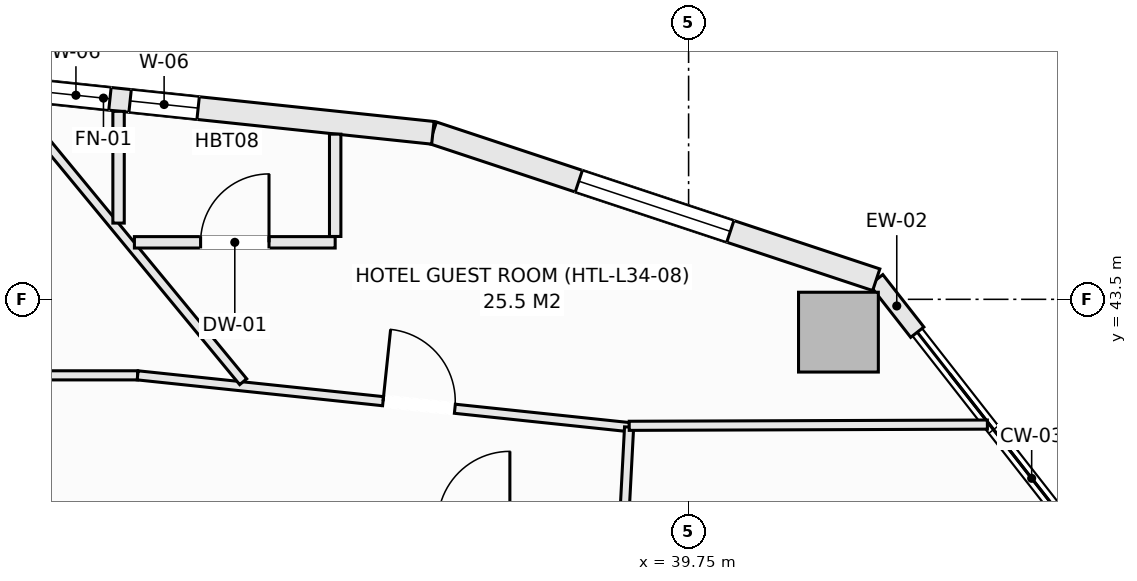
"""IFC4 building model, lengths in metres.
Left out: names, types, materials, properties, quantities, classifications, styles, units other than length and angle.
Written with IfcOpenShell. Run it as: python <this file> out.ifc"""

import sys

from ifc_helpers import new_model, si_unit, direction, frame, frame_2d, origin, origin_2d, place, context, subcontext, project, spatial, rectangle, extrude, element, fill, save


model = new_model("IFC4")
c1 = context("Model", 3, precision=1e-05, world=origin(), true_north=direction((0.0, 1.0)))
c2 = subcontext(c1, "Body", "Model", "MODEL_VIEW")
j1 = project(units=[si_unit("LENGTHUNIT", "METRE"), si_unit("PLANEANGLEUNIT", "RADIAN")], contexts=[c1])
p1 = place(None, origin())
s1 = spatial("IfcSite", under=j1, at=p1, CompositionType="ELEMENT")
p2 = place(p1, origin())
s2 = spatial("IfcBuilding", under=s1, at=p2, CompositionType="ELEMENT")
p3 = place(p2, frame((0.0, 0.0, 135.9)))
s3 = spatial("IfcBuildingStorey", under=s2, at=p3, CompositionType="ELEMENT", Elevation=135.9)
p4 = place(p3, frame((41.721, 43.068, -0.27), z_axis=(0.0, 0.0, 1.0), x_axis=(1.0, 0.0, 0.0)))
e1 = element("IfcColumn", 1, at=p4, inside=s3, PredefinedType="COLUMN", context=c2, shape_type="SweptSolid", body=[
    extrude(rectangle(XDim=1.05, YDim=1.05, at=origin_2d()), origin(), (0.0, 0.0, 1.0), 3.4),
])
p5 = place(p3, frame((42.219, 43.758, 0.0), z_axis=(0.0, 0.0, 1.0), x_axis=(0.61650363284, -0.787352062736, 0.0)))
e2 = element("IfcWall", 2, at=p5, inside=s3, PredefinedType="SOLIDWALL", context=c2, shape_type="SweptSolid", body=[
    extrude(rectangle(XDim=0.876, YDim=0.22, at=frame_2d((0.438, 0.0))), origin(), (0.0, 0.0, 1.0), 2.653),
])
p6 = place(p3, frame((36.385, 45.691, 0.0), z_axis=(0.0, 0.0, 1.0), x_axis=(0.949238009374, -0.314558741032, 0.0)))
e3 = element("IfcWall", 3, at=p6, inside=s3, PredefinedType="SOLIDWALL", context=c2, shape_type="SweptSolid", body=[
    extrude(rectangle(XDim=6.146, YDim=0.3, at=frame_2d((3.073, 0.0))), origin(), (0.0, 0.0, 1.0), 2.653),
])
p7 = place(p6, frame((2.023, 0.0, 0.74)))
e4 = element("IfcOpeningElement", 4, at=p7, cuts=e3, PredefinedType="OPENING", context=c2, shape_type="SweptSolid", body=[
    extrude(rectangle(XDim=2.1, YDim=1.7, at=frame_2d((1.05, 0.85))), frame((0.0, 0.16, 0.0), z_axis=(0.0, -1.0, 0.0), x_axis=(1.0, 0.0, 0.0)), (0.0, 0.0, 1.0), 0.32),
])
p8 = place(p3, frame((30.125, 46.35, 0.0), z_axis=(0.0, 0.0, 1.0), x_axis=(0.994498012394, -0.104755445421, 0.0)))
e5 = element("IfcWall", 5, at=p8, inside=s3, PredefinedType="SOLIDWALL", context=c2, shape_type="SweptSolid", body=[
    extrude(rectangle(XDim=6.295, YDim=0.3, at=frame_2d((3.147, 0.0))), origin(), (0.0, 0.0, 1.0), 2.653),
])
p9 = place(p8, frame((1.123, 0.0, 0.74)))
e6 = element("IfcOpeningElement", 6, at=p9, cuts=e5, PredefinedType="OPENING", context=c2, shape_type="SweptSolid", body=[
    extrude(rectangle(XDim=0.9, YDim=1.7, at=frame_2d((0.45, 0.85))), frame((0.0, 0.16, 0.0), z_axis=(0.0, -1.0, 0.0), x_axis=(1.0, 0.0, 0.0)), (0.0, 0.0, 1.0), 0.32),
])
p10 = place(p8, frame((2.289, 0.0, 0.74)))
e7 = element("IfcOpeningElement", 7, at=p10, cuts=e5, PredefinedType="OPENING", context=c2, shape_type="SweptSolid", body=[
    extrude(rectangle(XDim=0.9, YDim=1.7, at=frame_2d((0.45, 0.85))), frame((0.0, 0.16, 0.0), z_axis=(0.0, -1.0, 0.0), x_axis=(1.0, 0.0, 0.0)), (0.0, 0.0, 1.0), 0.32),
])
p11 = place(p3, frame((27.749, 42.5, 0.0), z_axis=(0.0, 0.0, 1.0), x_axis=(1.0, 0.0, 0.0)))
e8 = element("IfcWall", 8, at=p11, inside=s3, PredefinedType="PARTITIONING", context=c2, shape_type="SweptSolid", body=[
    extrude(rectangle(XDim=4.752, YDim=0.12, at=frame_2d((2.376, 0.0))), origin(), (0.0, 0.0, 1.0), 3.13),
])
p12 = place(p3, frame((32.501, 42.5, 0.0), z_axis=(0.0, 0.0, 1.0), x_axis=(0.994501131299, -0.104725831799, 0.0)))
e9 = element("IfcWall", 9, at=p12, inside=s3, PredefinedType="PARTITIONING", context=c2, shape_type="SweptSolid", body=[
    extrude(rectangle(XDim=6.502, YDim=0.12, at=frame_2d((3.251, 0.0))), origin(), (0.0, 0.0, 1.0), 3.13),
])
p13 = place(p12, frame((3.247, 0.0, 0.0)))
e10 = element("IfcOpeningElement", 10, at=p13, cuts=e9, PredefinedType="OPENING", context=c2, shape_type="SweptSolid", body=[
    extrude(rectangle(XDim=0.95, YDim=2.1, at=frame_2d((0.475, 1.05))), frame((0.0, 0.07, 0.0), z_axis=(0.0, -1.0, 0.0), x_axis=(1.0, 0.0, 0.0)), (0.0, 0.0, 1.0), 0.14),
])
p14 = place(p3, frame((38.9, 40.55, 0.0), z_axis=(0.0, 0.0, 1.0), x_axis=(0.052831079727, 0.99860346335, 0.0)))
e11 = element("IfcWall", 11, at=p14, inside=s3, PredefinedType="PARTITIONING", context=c2, shape_type="SweptSolid", body=[
    extrude(rectangle(XDim=1.271, YDim=0.12, at=frame_2d((0.635, 0.0))), origin(), (0.0, 0.0, 1.0), 3.13),
])
p15 = place(p3, frame((30.835, 46.122, 0.0), z_axis=(0.0, 0.0, 1.0), x_axis=(0.636070633964, -0.771630836999, 0.0)))
e12 = element("IfcWall", 12, at=p15, inside=s3, PredefinedType="PARTITIONING", context=c2, shape_type="SweptSolid", body=[
    extrude(rectangle(XDim=4.803, YDim=0.12, at=frame_2d((2.402, 0.0))), origin(), (0.0, 0.0, 1.0), 2.653),
])
p16 = place(p3, frame((38.969, 41.836, 0.0), z_axis=(0.0, 0.0, 1.0), x_axis=(0.999993975638, 0.003471121975, 0.0)))
e13 = element("IfcWall", 13, at=p16, inside=s3, PredefinedType="PARTITIONING", context=c2, shape_type="SweptSolid", body=[
    extrude(rectangle(XDim=4.712, YDim=0.12, at=frame_2d((2.356, 0.0))), origin(), (0.0, 0.0, 1.0), 2.653),
])
p17 = place(p3, frame((32.458, 44.25, 0.0), z_axis=(0.0, 0.0, 1.0), x_axis=(1.0, 0.0, 0.0)))
e14 = element("IfcWall", 14, at=p17, inside=s3, PredefinedType="PARTITIONING", context=c2, shape_type="SweptSolid", body=[
    extrude(rectangle(XDim=2.642, YDim=0.15, at=frame_2d((1.321, 0.0))), origin(), (0.0, 0.0, 1.0), 3.13),
])
p18 = place(p17, frame((0.871, 0.0, 0.0)))
e15 = element("IfcOpeningElement", 15, at=p18, cuts=e14, PredefinedType="OPENING", context=c2, shape_type="SweptSolid", body=[
    extrude(rectangle(XDim=0.9, YDim=2.1, at=frame_2d((0.45, 1.05))), frame((0.0, 0.085, 0.0), z_axis=(0.0, -1.0, 0.0), x_axis=(1.0, 0.0, 0.0)), (0.0, 0.0, 1.0), 0.17),
])
p19 = place(p3, frame((35.1, 44.327, 0.0), z_axis=(0.0, 0.0, 1.0), x_axis=(0.0, 1.0, 0.0)))
e16 = element("IfcWall", 16, at=p19, inside=s3, PredefinedType="PARTITIONING", context=c2, shape_type="SweptSolid", body=[
    extrude(rectangle(XDim=1.346, YDim=0.15, at=frame_2d((0.673, 0.0))), origin(), (0.0, 0.0, 1.0), 3.13),
])
p20 = place(p3, frame((32.25, 44.503, 0.0), z_axis=(0.0, 0.0, 1.0), x_axis=(0.0, 1.0, 0.0)))
e17 = element("IfcWall", 17, at=p20, inside=s3, PredefinedType="PARTITIONING", context=c2, shape_type="SweptSolid", body=[
    extrude(rectangle(XDim=1.47, YDim=0.15, at=frame_2d((0.735, 0.0))), origin(), (0.0, 0.0, 1.0), 3.13),
])
p21 = place(p7, origin())
e18 = element("IfcWindow", 18, at=p21, inside=s3, PartitioningType="SINGLE_PANEL", PredefinedType="WINDOW", context=c2, shape_type="SweptSolid", body=[
    extrude(rectangle(XDim=2.1, YDim=1.7, at=frame_2d((1.05, 0.85))), frame((0.0, 0.03, 0.0), z_axis=(0.0, -1.0, 0.0), x_axis=(1.0, 0.0, 0.0)), (0.0, 0.0, 1.0), 0.06),
])
fill(e4, e18)
p22 = place(p9, origin())
e19 = element("IfcWindow", 19, at=p22, inside=s3, PartitioningType="SINGLE_PANEL", PredefinedType="WINDOW", context=c2, shape_type="SweptSolid", body=[
    extrude(rectangle(XDim=0.9, YDim=1.7, at=frame_2d((0.45, 0.85))), frame((0.0, 0.03, 0.0), z_axis=(0.0, -1.0, 0.0), x_axis=(1.0, 0.0, 0.0)), (0.0, 0.0, 1.0), 0.06),
])
fill(e6, e19)
p23 = place(p13, origin())
e20 = element("IfcDoor", 20, at=p23, inside=s3, OperationType="SINGLE_SWING_LEFT", PredefinedType="DOOR", context=c2, shape_type="SweptSolid", body=[
    extrude(rectangle(XDim=0.95, YDim=2.1, at=frame_2d((0.475, 1.05))), frame((0.0, 0.025, 0.0), z_axis=(0.0, -1.0, 0.0), x_axis=(1.0, 0.0, 0.0)), (0.0, 0.0, 1.0), 0.05),
])
fill(e10, e20)
p24 = place(p18, origin())
e21 = element("IfcDoor", 21, at=p24, inside=s3, OperationType="SINGLE_SWING_RIGHT", PredefinedType="DOOR", context=c2, shape_type="SweptSolid", body=[
    extrude(rectangle(XDim=0.9, YDim=2.1, at=frame_2d((0.45, 1.05))), frame((0.0, 0.025, 0.0), z_axis=(0.0, -1.0, 0.0), x_axis=(1.0, 0.0, 0.0)), (0.0, 0.0, 1.0), 0.05),
])
fill(e15, e21)
p25 = place(p10, origin())
e22 = element("IfcWindow", 22, at=p25, inside=s3, PartitioningType="SINGLE_PANEL", PredefinedType="WINDOW", context=c2, shape_type="SweptSolid", body=[
    extrude(rectangle(XDim=0.9, YDim=1.7, at=frame_2d((0.45, 0.85))), frame((0.0, 0.03, 0.0), z_axis=(0.0, -1.0, 0.0), x_axis=(1.0, 0.0, 0.0)), (0.0, 0.0, 1.0), 0.06),
])
fill(e7, e22)
save(model, sys.argv[1])
